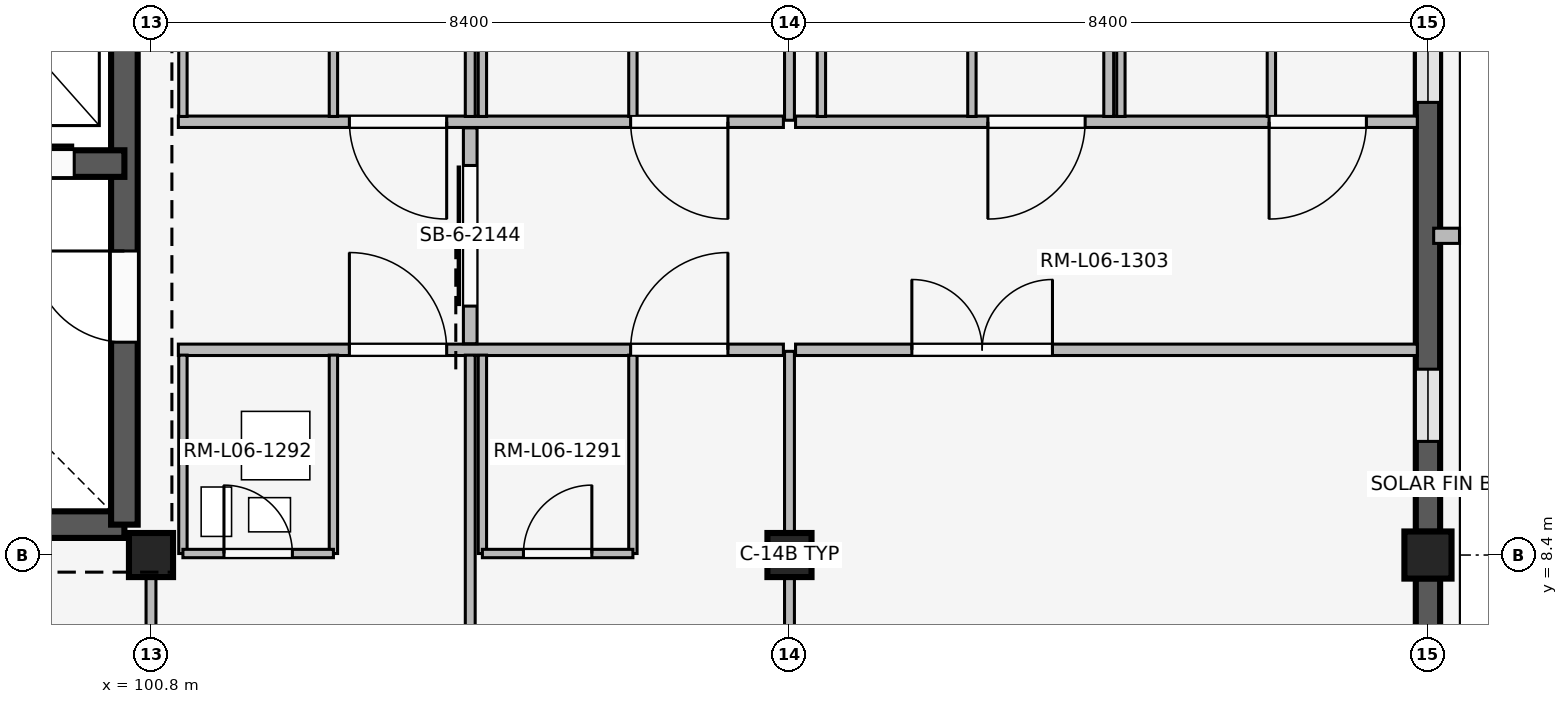
"""IFC4 building model, lengths in metres.
Left out: names, types, materials, properties, quantities, classifications, styles, units other than length and angle.
Written with IfcOpenShell. Run it as: python <this file> out.ifc"""

import sys

from ifc_helpers import new_model, si_unit, direction, frame, frame_2d, origin, origin_2d, place, context, subcontext, project, spatial, rectangle, extrude, element, fill, save


model = new_model("IFC4")
c1 = context("Model", 3, precision=1e-05, world=origin(), true_north=direction((0.0, 1.0)))
c2 = subcontext(c1, "Body", "Model", "MODEL_VIEW")
j1 = project(units=[si_unit("LENGTHUNIT", "METRE"), si_unit("PLANEANGLEUNIT", "RADIAN")], contexts=[c1])
p1 = place(None, origin())
s1 = spatial("IfcSite", under=j1, at=p1, CompositionType="ELEMENT")
p2 = place(p1, origin())
s2 = spatial("IfcBuilding", under=s1, at=p2, CompositionType="ELEMENT")
p3 = place(p2, frame((0.0, 0.0, 24.6)))
s3 = spatial("IfcBuildingStorey", under=s2, at=p3, CompositionType="ELEMENT", Elevation=24.6)
for number, where, z_axis, x_axis in (
    (1, (100.8, 8.4, 0.0), (0.0, 0.0, 1.0), (1.0, 0.0, 0.0)),
    (2, (109.2, 8.4, 0.0), (0.0, 0.0, 1.0), (1.0, 0.0, 0.0)),
):
    element("IfcColumn", number, at=place(p3, frame(where, z_axis=z_axis, x_axis=x_axis)), inside=s3, PredefinedType="COLUMN", context=c2, shape_type="SweptSolid", body=[
        extrude(rectangle(XDim=0.58, YDim=0.58, at=origin_2d()), origin(), (0.0, 0.0, 1.0), 4.2),
    ])
p4 = place(p3, frame((117.6, 8.4, 0.0), z_axis=(0.0, 0.0, 1.0), x_axis=(1.0, 0.0, 0.0)))
e3 = element("IfcColumn", 3, at=p4, inside=s3, PredefinedType="COLUMN", context=c2, shape_type="SweptSolid", body=[
    extrude(rectangle(XDim=0.62, YDim=0.62, at=origin_2d()), origin(), (0.0, 0.0, 1.0), 4.2),
])
p5 = place(p3, frame((117.6, 8.095, 0.0), z_axis=(0.0, 0.0, 1.0), x_axis=(0.0, -1.0, 0.0)))
e4 = element("IfcWall", 4, at=p5, inside=s3, PredefinedType="SOLIDWALL", context=c2, shape_type="SweptSolid", body=[
    extrude(rectangle(XDim=7.79, YDim=0.32, at=frame_2d((3.895, 0.0))), origin(), (0.0, 0.0, 1.0), 3.34),
])
p6 = place(p5, frame((1.467, 0.0, 0.85)))
e5 = element("IfcOpeningElement", 5, at=p6, cuts=e4, PredefinedType="OPENING", context=c2, shape_type="SweptSolid", body=[
    extrude(rectangle(XDim=0.65, YDim=1.75, at=frame_2d((0.325, 0.875))), frame((0.0, 0.17, 0.0), z_axis=(0.0, -1.0, 0.0), x_axis=(1.0, 0.0, 0.0)), (0.0, 0.0, 1.0), 0.34),
])
p7 = place(p5, frame((5.673, 0.0, 0.85)))
e6 = element("IfcOpeningElement", 6, at=p7, cuts=e4, PredefinedType="OPENING", context=c2, shape_type="SweptSolid", body=[
    extrude(rectangle(XDim=0.65, YDim=1.75, at=frame_2d((0.325, 0.875))), frame((0.0, 0.17, 0.0), z_axis=(0.0, -1.0, 0.0), x_axis=(1.0, 0.0, 0.0)), (0.0, 0.0, 1.0), 0.34),
])
p8 = place(p3, frame((117.6, 16.495, 0.0), z_axis=(0.0, 0.0, 1.0), x_axis=(0.0, -1.0, 0.0)))
e7 = element("IfcWall", 7, at=p8, inside=s3, PredefinedType="SOLIDWALL", context=c2, shape_type="SweptSolid", body=[
    extrude(rectangle(XDim=7.79, YDim=0.32, at=frame_2d((3.895, 0.0))), origin(), (0.0, 0.0, 1.0), 3.34),
])
p9 = place(p8, frame((1.19, 0.0, 0.85)))
e8 = element("IfcOpeningElement", 8, at=p9, cuts=e7, PredefinedType="OPENING", context=c2, shape_type="SweptSolid", body=[
    extrude(rectangle(XDim=0.95, YDim=1.6, at=frame_2d((0.475, 0.8))), frame((0.0, 0.17, 0.0), z_axis=(0.0, -1.0, 0.0), x_axis=(1.0, 0.0, 0.0)), (0.0, 0.0, 1.0), 0.34),
])
p10 = place(p8, frame((5.65, 0.0, 0.85)))
e9 = element("IfcOpeningElement", 9, at=p10, cuts=e7, PredefinedType="OPENING", context=c2, shape_type="SweptSolid", body=[
    extrude(rectangle(XDim=0.95, YDim=1.6, at=frame_2d((0.475, 0.8))), frame((0.0, 0.17, 0.0), z_axis=(0.0, -1.0, 0.0), x_axis=(1.0, 0.0, 0.0)), (0.0, 0.0, 1.0), 0.34),
])
p11 = place(p3, frame((117.675, 12.6, 0.0), z_axis=(0.0, 0.0, 1.0), x_axis=(1.0, 0.0, 0.0)))
e10 = element("IfcWall", 10, at=p11, inside=s3, PredefinedType="ELEMENTEDWALL", context=c2, shape_type="SweptSolid", body=[
    extrude(rectangle(XDim=0.34, YDim=0.2, at=frame_2d((0.17, 0.0))), origin(), (0.0, 0.0, 1.0), 3.32),
])
p12 = place(p3, frame((92.95, 8.8, 0.0), z_axis=(0.0, 0.0, 1.0), x_axis=(1.0, 0.0, 0.0)))
e11 = element("IfcWall", 11, at=p12, inside=s3, PredefinedType="SHEAR", context=c2, shape_type="SweptSolid", body=[
    extrude(rectangle(XDim=7.5, YDim=0.35, at=frame_2d((3.75, 0.0))), origin(), (0.0, 0.0, 1.0), 3.92),
])
p13 = place(p12, frame((4.85, 0.0, 0.0)))
e12 = element("IfcOpeningElement", 12, at=p13, cuts=e11, PredefinedType="OPENING", context=c2, shape_type="SweptSolid", body=[
    extrude(rectangle(XDim=1.2, YDim=2.2, at=frame_2d((0.6, 1.1))), frame((0.0, 0.185, 0.0), z_axis=(0.0, -1.0, 0.0), x_axis=(1.0, 0.0, 0.0)), (0.0, 0.0, 1.0), 0.37),
])
p14 = place(p3, frame((100.45, 8.8, 0.0), z_axis=(0.0, 0.0, 1.0), x_axis=(0.0, 1.0, 0.0)))
e13 = element("IfcWall", 13, at=p14, inside=s3, PredefinedType="SHEAR", context=c2, shape_type="SweptSolid", body=[
    extrude(rectangle(XDim=7.55, YDim=0.35, at=frame_2d((3.775, 0.0))), origin(), (0.0, 0.0, 1.0), 3.92),
])
p15 = place(p14, frame((2.4, 0.0, 0.0)))
e14 = element("IfcOpeningElement", 14, at=p15, cuts=e13, PredefinedType="OPENING", context=c2, shape_type="SweptSolid", body=[
    extrude(rectangle(XDim=1.2, YDim=2.2, at=frame_2d((0.6, 1.1))), frame((0.0, 0.185, 0.0), z_axis=(0.0, -1.0, 0.0), x_axis=(1.0, 0.0, 0.0)), (0.0, 0.0, 1.0), 0.37),
])
p16 = place(p3, frame((96.65, 13.55, 0.0), z_axis=(0.0, 0.0, 1.0), x_axis=(1.0, 0.0, 0.0)))
e15 = element("IfcWall", 15, at=p16, inside=s3, PredefinedType="SHEAR", context=c2, shape_type="SweptSolid", body=[
    extrude(rectangle(XDim=3.8, YDim=0.35, at=frame_2d((1.9, 0.0))), origin(), (0.0, 0.0, 1.0), 3.92),
])
p17 = place(p16, frame((0.32, 0.0, 0.0)))
e16 = element("IfcOpeningElement", 16, at=p17, cuts=e15, PredefinedType="OPENING", context=c2, shape_type="SweptSolid", body=[
    extrude(rectangle(XDim=1.4, YDim=2.25, at=frame_2d((0.7, 1.125))), frame((0.0, 0.185, 0.0), z_axis=(0.0, -1.0, 0.0), x_axis=(1.0, 0.0, 0.0)), (0.0, 0.0, 1.0), 0.37),
])
p18 = place(p16, frame((2.04, 0.0, 0.0)))
e17 = element("IfcOpeningElement", 17, at=p18, cuts=e15, PredefinedType="OPENING", context=c2, shape_type="SweptSolid", body=[
    extrude(rectangle(XDim=1.1, YDim=2.15, at=frame_2d((0.55, 1.075))), frame((0.0, 0.185, 0.0), z_axis=(0.0, -1.0, 0.0), x_axis=(1.0, 0.0, 0.0)), (0.0, 0.0, 1.0), 0.37),
])
p19 = place(p3, frame((100.8, 0.14, 0.0), z_axis=(0.0, 0.0, 1.0), x_axis=(0.0, 1.0, 0.0)))
e18 = element("IfcWall", 18, at=p19, inside=s3, PredefinedType="PARTITIONING", context=c2, shape_type="SweptSolid", body=[
    extrude(rectangle(XDim=8.21, YDim=0.13, at=frame_2d((4.105, 0.0))), origin(), (0.0, 0.0, 1.0), 3.32),
])
p20 = place(p19, frame((3.64, 0.0, 0.0)))
e19 = element("IfcOpeningElement", 19, at=p20, cuts=e18, PredefinedType="OPENING", context=c2, shape_type="SweptSolid", body=[
    extrude(rectangle(XDim=1.08, YDim=2.15, at=frame_2d((0.54, 1.075))), frame((0.0, 0.075, 0.0), z_axis=(0.0, -1.0, 0.0), x_axis=(1.0, 0.0, 0.0)), (0.0, 0.0, 1.0), 0.15),
])
p21 = place(p3, frame((101.16, 11.1, 0.0), z_axis=(0.0, 0.0, 1.0), x_axis=(1.0, 0.0, 0.0)))
e20 = element("IfcWall", 20, at=p21, inside=s3, PredefinedType="PARTITIONING", context=c2, shape_type="SweptSolid", body=[
    extrude(rectangle(XDim=7.96, YDim=0.15, at=frame_2d((3.98, 0.0))), origin(), (0.0, 0.0, 1.0), 3.32),
])
p22 = place(p21, frame((2.25, 0.0, 0.0)))
e21 = element("IfcOpeningElement", 21, at=p22, cuts=e20, PredefinedType="OPENING", context=c2, shape_type="SweptSolid", body=[
    extrude(rectangle(XDim=1.28, YDim=2.2, at=frame_2d((0.64, 1.1))), frame((0.0, 0.085, 0.0), z_axis=(0.0, -1.0, 0.0), x_axis=(1.0, 0.0, 0.0)), (0.0, 0.0, 1.0), 0.17),
])
p23 = place(p21, frame((5.95, 0.0, 0.0)))
e22 = element("IfcOpeningElement", 22, at=p23, cuts=e20, PredefinedType="OPENING", context=c2, shape_type="SweptSolid", body=[
    extrude(rectangle(XDim=1.28, YDim=2.2, at=frame_2d((0.64, 1.1))), frame((0.0, 0.085, 0.0), z_axis=(0.0, -1.0, 0.0), x_axis=(1.0, 0.0, 0.0)), (0.0, 0.0, 1.0), 0.17),
])
p24 = place(p3, frame((105.0, 0.1, 0.0), z_axis=(0.0, 0.0, 1.0), x_axis=(0.0, 1.0, 0.0)))
e23 = element("IfcWall", 23, at=p24, inside=s3, PredefinedType="PARTITIONING", context=c2, shape_type="SweptSolid", body=[
    extrude(rectangle(XDim=10.93, YDim=0.13, at=frame_2d((5.465, 0.0))), origin(), (0.0, 0.0, 1.0), 3.32),
])
for number, where, z_axis, x_axis in (
    (24, (101.22, 8.42, 0.0), (0.0, 0.0, 1.0), (0.0, 1.0, 0.0)),
    (25, (103.2, 8.42, 0.0), (0.0, 0.0, 1.0), (0.0, 1.0, 0.0)),
):
    element("IfcWall", number, at=place(p3, frame(where, z_axis=z_axis, x_axis=x_axis)), inside=s3, PredefinedType="PARTITIONING", context=c2, shape_type="SweptSolid", body=[
        extrude(rectangle(XDim=2.61, YDim=0.11, at=frame_2d((1.305, 0.0))), origin(), (0.0, 0.0, 1.0), 3.32),
    ])
p25 = place(p3, frame((101.22, 8.42, 0.0), z_axis=(0.0, 0.0, 1.0), x_axis=(1.0, 0.0, 0.0)))
e26 = element("IfcWall", 26, at=p25, inside=s3, PredefinedType="PARTITIONING", context=c2, shape_type="SweptSolid", body=[
    extrude(rectangle(XDim=1.98, YDim=0.11, at=frame_2d((0.99, 0.0))), origin(), (0.0, 0.0, 1.0), 3.32),
])
p26 = place(p25, frame((0.54, 0.0, 0.0)))
e27 = element("IfcOpeningElement", 27, at=p26, cuts=e26, PredefinedType="OPENING", context=c2, shape_type="SweptSolid", body=[
    extrude(rectangle(XDim=0.9, YDim=2.1, at=frame_2d((0.45, 1.05))), frame((0.0, 0.065, 0.0), z_axis=(0.0, -1.0, 0.0), x_axis=(1.0, 0.0, 0.0)), (0.0, 0.0, 1.0), 0.13),
])
for number, where, z_axis, x_axis in (
    (28, (105.16, 8.42, 0.0), (0.0, 0.0, 1.0), (0.0, 1.0, 0.0)),
    (29, (107.14, 8.42, 0.0), (0.0, 0.0, 1.0), (0.0, 1.0, 0.0)),
):
    element("IfcWall", number, at=place(p3, frame(where, z_axis=z_axis, x_axis=x_axis)), inside=s3, PredefinedType="PARTITIONING", context=c2, shape_type="SweptSolid", body=[
        extrude(rectangle(XDim=2.61, YDim=0.11, at=frame_2d((1.305, 0.0))), origin(), (0.0, 0.0, 1.0), 3.32),
    ])
p27 = place(p3, frame((105.16, 8.42, 0.0), z_axis=(0.0, 0.0, 1.0), x_axis=(1.0, 0.0, 0.0)))
e30 = element("IfcWall", 30, at=p27, inside=s3, PredefinedType="PARTITIONING", context=c2, shape_type="SweptSolid", body=[
    extrude(rectangle(XDim=1.98, YDim=0.11, at=frame_2d((0.99, 0.0))), origin(), (0.0, 0.0, 1.0), 3.32),
])
p28 = place(p27, frame((0.54, 0.0, 0.0)))
e31 = element("IfcOpeningElement", 31, at=p28, cuts=e30, PredefinedType="OPENING", context=c2, shape_type="SweptSolid", body=[
    extrude(rectangle(XDim=0.9, YDim=2.1, at=frame_2d((0.45, 1.05))), frame((0.0, 0.065, 0.0), z_axis=(0.0, -1.0, 0.0), x_axis=(1.0, 0.0, 0.0)), (0.0, 0.0, 1.0), 0.13),
])
p29 = place(p3, frame((109.12, 14.1, 0.0), z_axis=(0.0, 0.0, 1.0), x_axis=(-1.0, 0.0, 0.0)))
e32 = element("IfcWall", 32, at=p29, inside=s3, PredefinedType="PARTITIONING", context=c2, shape_type="SweptSolid", body=[
    extrude(rectangle(XDim=7.96, YDim=0.15, at=frame_2d((3.98, 0.0))), origin(), (0.0, 0.0, 1.0), 3.32),
])
p30 = place(p29, frame((0.73, 0.0, 0.0)))
e33 = element("IfcOpeningElement", 33, at=p30, cuts=e32, PredefinedType="OPENING", context=c2, shape_type="SweptSolid", body=[
    extrude(rectangle(XDim=1.28, YDim=2.2, at=frame_2d((0.64, 1.1))), frame((0.0, 0.085, 0.0), z_axis=(0.0, -1.0, 0.0), x_axis=(1.0, 0.0, 0.0)), (0.0, 0.0, 1.0), 0.17),
])
p31 = place(p29, frame((4.43, 0.0, 0.0)))
e34 = element("IfcOpeningElement", 34, at=p31, cuts=e32, PredefinedType="OPENING", context=c2, shape_type="SweptSolid", body=[
    extrude(rectangle(XDim=1.28, YDim=2.2, at=frame_2d((0.64, 1.1))), frame((0.0, 0.085, 0.0), z_axis=(0.0, -1.0, 0.0), x_axis=(1.0, 0.0, 0.0)), (0.0, 0.0, 1.0), 0.17),
])
p32 = place(p3, frame((105.0, 14.17, 0.0), z_axis=(0.0, 0.0, 1.0), x_axis=(0.0, 1.0, 0.0)))
e35 = element("IfcWall", 35, at=p32, inside=s3, PredefinedType="PARTITIONING", context=c2, shape_type="SweptSolid", body=[
    extrude(rectangle(XDim=10.93, YDim=0.13, at=frame_2d((5.465, 0.0))), origin(), (0.0, 0.0, 1.0), 3.32),
])
for number, where, z_axis, x_axis in (
    (36, (101.22, 14.17, 0.0), (0.0, 0.0, 1.0), (0.0, 1.0, 0.0)),
    (37, (103.2, 14.17, 0.0), (0.0, 0.0, 1.0), (0.0, 1.0, 0.0)),
    (38, (105.16, 14.17, 0.0), (0.0, 0.0, 1.0), (0.0, 1.0, 0.0)),
    (39, (107.14, 14.17, 0.0), (0.0, 0.0, 1.0), (0.0, 1.0, 0.0)),
):
    element("IfcWall", number, at=place(p3, frame(where, z_axis=z_axis, x_axis=x_axis)), inside=s3, PredefinedType="PARTITIONING", context=c2, shape_type="SweptSolid", body=[
        extrude(rectangle(XDim=2.61, YDim=0.11, at=frame_2d((1.305, 0.0))), origin(), (0.0, 0.0, 1.0), 3.32),
    ])
p33 = place(p3, frame((105.0, 11.18, 0.0), z_axis=(0.0, 0.0, 1.0), x_axis=(0.0, 1.0, 0.0)))
e40 = element("IfcWall", 40, at=p33, inside=s3, PredefinedType="PARTITIONING", context=c2, shape_type="SweptSolid", body=[
    extrude(rectangle(XDim=2.84, YDim=0.18, at=frame_2d((1.42, 0.0))), origin(), (0.0, 0.0, 1.0), 3.32),
])
p34 = place(p33, frame((0.495, 0.0, 0.0)))
e41 = element("IfcOpeningElement", 41, at=p34, cuts=e40, PredefinedType="OPENING", context=c2, shape_type="SweptSolid", body=[
    extrude(rectangle(XDim=1.85, YDim=2.3, at=frame_2d((0.925, 1.15))), frame((0.0, 0.1, 0.0), z_axis=(0.0, -1.0, 0.0), x_axis=(1.0, 0.0, 0.0)), (0.0, 0.0, 1.0), 0.2),
])
p35 = place(p3, frame((109.2, 0.14, 0.0), z_axis=(0.0, 0.0, 1.0), x_axis=(0.0, 1.0, 0.0)))
e42 = element("IfcWall", 42, at=p35, inside=s3, PredefinedType="PARTITIONING", context=c2, shape_type="SweptSolid", body=[
    extrude(rectangle(XDim=10.94, YDim=0.13, at=frame_2d((5.47, 0.0))), origin(), (0.0, 0.0, 1.0), 3.32),
])
p36 = place(p3, frame((109.2, 14.12, 0.0), z_axis=(0.0, 0.0, 1.0), x_axis=(0.0, 1.0, 0.0)))
e43 = element("IfcWall", 43, at=p36, inside=s3, PredefinedType="PARTITIONING", context=c2, shape_type="SweptSolid", body=[
    extrude(rectangle(XDim=10.94, YDim=0.13, at=frame_2d((5.47, 0.0))), origin(), (0.0, 0.0, 1.0), 3.32),
])
p37 = place(p3, frame((109.28, 11.1, 0.0), z_axis=(0.0, 0.0, 1.0), x_axis=(1.0, 0.0, 0.0)))
e44 = element("IfcWall", 44, at=p37, inside=s3, PredefinedType="PARTITIONING", context=c2, shape_type="SweptSolid", body=[
    extrude(rectangle(XDim=8.18, YDim=0.15, at=frame_2d((4.09, 0.0))), origin(), (0.0, 0.0, 1.0), 3.32),
])
p38 = place(p37, frame((1.53, 0.0, 0.0)))
e45 = element("IfcOpeningElement", 45, at=p38, cuts=e44, PredefinedType="OPENING", context=c2, shape_type="SweptSolid", body=[
    extrude(rectangle(XDim=1.85, YDim=2.3, at=frame_2d((0.925, 1.15))), frame((0.0, 0.085, 0.0), z_axis=(0.0, -1.0, 0.0), x_axis=(1.0, 0.0, 0.0)), (0.0, 0.0, 1.0), 0.17),
])
p39 = place(p3, frame((117.46, 14.1, 0.0), z_axis=(0.0, 0.0, 1.0), x_axis=(-1.0, 0.0, 0.0)))
e46 = element("IfcWall", 46, at=p39, inside=s3, PredefinedType="PARTITIONING", context=c2, shape_type="SweptSolid", body=[
    extrude(rectangle(XDim=8.18, YDim=0.15, at=frame_2d((4.09, 0.0))), origin(), (0.0, 0.0, 1.0), 3.32),
])
p40 = place(p39, frame((0.67, 0.0, 0.0)))
e47 = element("IfcOpeningElement", 47, at=p40, cuts=e46, PredefinedType="OPENING", context=c2, shape_type="SweptSolid", body=[
    extrude(rectangle(XDim=1.28, YDim=2.2, at=frame_2d((0.64, 1.1))), frame((0.0, 0.085, 0.0), z_axis=(0.0, -1.0, 0.0), x_axis=(1.0, 0.0, 0.0)), (0.0, 0.0, 1.0), 0.17),
])
p41 = place(p39, frame((4.37, 0.0, 0.0)))
e48 = element("IfcOpeningElement", 48, at=p41, cuts=e46, PredefinedType="OPENING", context=c2, shape_type="SweptSolid", body=[
    extrude(rectangle(XDim=1.28, YDim=2.2, at=frame_2d((0.64, 1.1))), frame((0.0, 0.085, 0.0), z_axis=(0.0, -1.0, 0.0), x_axis=(1.0, 0.0, 0.0)), (0.0, 0.0, 1.0), 0.17),
])
p42 = place(p3, frame((113.4, 14.17, 0.0), z_axis=(0.0, 0.0, 1.0), x_axis=(0.0, 1.0, 0.0)))
e49 = element("IfcWall", 49, at=p42, inside=s3, PredefinedType="PARTITIONING", context=c2, shape_type="SweptSolid", body=[
    extrude(rectangle(XDim=10.93, YDim=0.13, at=frame_2d((5.465, 0.0))), origin(), (0.0, 0.0, 1.0), 3.32),
])
for number, where, z_axis, x_axis in (
    (50, (109.62, 14.17, 0.0), (0.0, 0.0, 1.0), (0.0, 1.0, 0.0)),
    (51, (111.6, 14.17, 0.0), (0.0, 0.0, 1.0), (0.0, 1.0, 0.0)),
    (52, (113.56, 14.17, 0.0), (0.0, 0.0, 1.0), (0.0, 1.0, 0.0)),
    (53, (115.54, 14.17, 0.0), (0.0, 0.0, 1.0), (0.0, 1.0, 0.0)),
):
    element("IfcWall", number, at=place(p3, frame(where, z_axis=z_axis, x_axis=x_axis)), inside=s3, PredefinedType="PARTITIONING", context=c2, shape_type="SweptSolid", body=[
        extrude(rectangle(XDim=2.61, YDim=0.11, at=frame_2d((1.305, 0.0))), origin(), (0.0, 0.0, 1.0), 3.32),
    ])
p43 = place(p9, origin())
e54 = element("IfcWindow", 54, at=p43, inside=s3, PartitioningType="SINGLE_PANEL", PredefinedType="WINDOW", context=c2, shape_type="SweptSolid", body=[
    extrude(rectangle(XDim=0.95, YDim=1.6, at=frame_2d((0.475, 0.8))), frame((0.0, 0.03, 0.0), z_axis=(0.0, -1.0, 0.0), x_axis=(1.0, 0.0, 0.0)), (0.0, 0.0, 1.0), 0.06),
])
fill(e8, e54)
p44 = place(p10, origin())
e55 = element("IfcWindow", 55, at=p44, inside=s3, PartitioningType="SINGLE_PANEL", PredefinedType="WINDOW", context=c2, shape_type="SweptSolid", body=[
    extrude(rectangle(XDim=0.95, YDim=1.6, at=frame_2d((0.475, 0.8))), frame((0.0, 0.03, 0.0), z_axis=(0.0, -1.0, 0.0), x_axis=(1.0, 0.0, 0.0)), (0.0, 0.0, 1.0), 0.06),
])
fill(e9, e55)
p45 = place(p15, origin())
e56 = element("IfcDoor", 56, at=p45, inside=s3, OperationType="SINGLE_SWING_RIGHT", PredefinedType="DOOR", context=c2, shape_type="SweptSolid", body=[
    extrude(rectangle(XDim=1.2, YDim=2.2, at=frame_2d((0.6, 1.1))), frame((0.0, 0.025, 0.0), z_axis=(0.0, -1.0, 0.0), x_axis=(1.0, 0.0, 0.0)), (0.0, 0.0, 1.0), 0.05),
])
fill(e14, e56)
p46 = place(p18, origin())
e57 = element("IfcDoor", 57, at=p46, inside=s3, OperationType="SLIDING_TO_LEFT", PredefinedType="DOOR", context=c2, shape_type="SweptSolid", body=[
    extrude(rectangle(XDim=1.1, YDim=2.15, at=frame_2d((0.55, 1.075))), frame((0.0, 0.025, 0.0), z_axis=(0.0, -1.0, 0.0), x_axis=(1.0, 0.0, 0.0)), (0.0, 0.0, 1.0), 0.05),
])
fill(e17, e57)
p47 = place(p22, origin())
e58 = element("IfcDoor", 58, at=p47, inside=s3, OperationType="SINGLE_SWING_LEFT", PredefinedType="DOOR", context=c2, shape_type="SweptSolid", body=[
    extrude(rectangle(XDim=1.28, YDim=2.2, at=frame_2d((0.64, 1.1))), frame((0.0, 0.025, 0.0), z_axis=(0.0, -1.0, 0.0), x_axis=(1.0, 0.0, 0.0)), (0.0, 0.0, 1.0), 0.05),
])
fill(e21, e58)
p48 = place(p23, origin())
e59 = element("IfcDoor", 59, at=p48, inside=s3, OperationType="SINGLE_SWING_RIGHT", PredefinedType="DOOR", context=c2, shape_type="SweptSolid", body=[
    extrude(rectangle(XDim=1.28, YDim=2.2, at=frame_2d((0.64, 1.1))), frame((0.0, 0.025, 0.0), z_axis=(0.0, -1.0, 0.0), x_axis=(1.0, 0.0, 0.0)), (0.0, 0.0, 1.0), 0.05),
])
fill(e22, e59)
p49 = place(p26, origin())
e60 = element("IfcDoor", 60, at=p49, inside=s3, OperationType="SINGLE_SWING_LEFT", PredefinedType="DOOR", context=c2, shape_type="SweptSolid", body=[
    extrude(rectangle(XDim=0.9, YDim=2.1, at=frame_2d((0.45, 1.05))), frame((0.0, 0.025, 0.0), z_axis=(0.0, -1.0, 0.0), x_axis=(1.0, 0.0, 0.0)), (0.0, 0.0, 1.0), 0.05),
])
fill(e27, e60)
p50 = place(p28, origin())
e61 = element("IfcDoor", 61, at=p50, inside=s3, OperationType="SINGLE_SWING_RIGHT", PredefinedType="DOOR", context=c2, shape_type="SweptSolid", body=[
    extrude(rectangle(XDim=0.9, YDim=2.1, at=frame_2d((0.45, 1.05))), frame((0.0, 0.025, 0.0), z_axis=(0.0, -1.0, 0.0), x_axis=(1.0, 0.0, 0.0)), (0.0, 0.0, 1.0), 0.05),
])
fill(e31, e61)
p51 = place(p30, origin())
e62 = element("IfcDoor", 62, at=p51, inside=s3, OperationType="SINGLE_SWING_LEFT", PredefinedType="DOOR", context=c2, shape_type="SweptSolid", body=[
    extrude(rectangle(XDim=1.28, YDim=2.2, at=frame_2d((0.64, 1.1))), frame((0.0, 0.025, 0.0), z_axis=(0.0, -1.0, 0.0), x_axis=(1.0, 0.0, 0.0)), (0.0, 0.0, 1.0), 0.05),
])
fill(e33, e62)
p52 = place(p31, origin())
e63 = element("IfcDoor", 63, at=p52, inside=s3, OperationType="SINGLE_SWING_LEFT", PredefinedType="DOOR", context=c2, shape_type="SweptSolid", body=[
    extrude(rectangle(XDim=1.28, YDim=2.2, at=frame_2d((0.64, 1.1))), frame((0.0, 0.025, 0.0), z_axis=(0.0, -1.0, 0.0), x_axis=(1.0, 0.0, 0.0)), (0.0, 0.0, 1.0), 0.05),
])
fill(e34, e63)
p53 = place(p34, origin())
e64 = element("IfcDoor", 64, at=p53, inside=s3, OperationType="SLIDING_TO_LEFT", PredefinedType="DOOR", context=c2, shape_type="SweptSolid", body=[
    extrude(rectangle(XDim=1.85, YDim=2.3, at=frame_2d((0.925, 1.15))), frame((0.0, 0.025, 0.0), z_axis=(0.0, -1.0, 0.0), x_axis=(1.0, 0.0, 0.0)), (0.0, 0.0, 1.0), 0.05),
])
fill(e41, e64)
p54 = place(p38, origin())
e65 = element("IfcDoor", 65, at=p54, inside=s3, OperationType="DOUBLE_SWING_LEFT", PredefinedType="DOOR", context=c2, shape_type="SweptSolid", body=[
    extrude(rectangle(XDim=1.85, YDim=2.3, at=frame_2d((0.925, 1.15))), frame((0.0, 0.025, 0.0), z_axis=(0.0, -1.0, 0.0), x_axis=(1.0, 0.0, 0.0)), (0.0, 0.0, 1.0), 0.05),
])
fill(e45, e65)
p55 = place(p40, origin())
e66 = element("IfcDoor", 66, at=p55, inside=s3, OperationType="SINGLE_SWING_RIGHT", PredefinedType="DOOR", context=c2, shape_type="SweptSolid", body=[
    extrude(rectangle(XDim=1.28, YDim=2.2, at=frame_2d((0.64, 1.1))), frame((0.0, 0.025, 0.0), z_axis=(0.0, -1.0, 0.0), x_axis=(1.0, 0.0, 0.0)), (0.0, 0.0, 1.0), 0.05),
])
fill(e47, e66)
p56 = place(p41, origin())
e67 = element("IfcDoor", 67, at=p56, inside=s3, OperationType="SINGLE_SWING_RIGHT", PredefinedType="DOOR", context=c2, shape_type="SweptSolid", body=[
    extrude(rectangle(XDim=1.28, YDim=2.2, at=frame_2d((0.64, 1.1))), frame((0.0, 0.025, 0.0), z_axis=(0.0, -1.0, 0.0), x_axis=(1.0, 0.0, 0.0)), (0.0, 0.0, 1.0), 0.05),
])
fill(e48, e67)
save(model, sys.argv[1])
